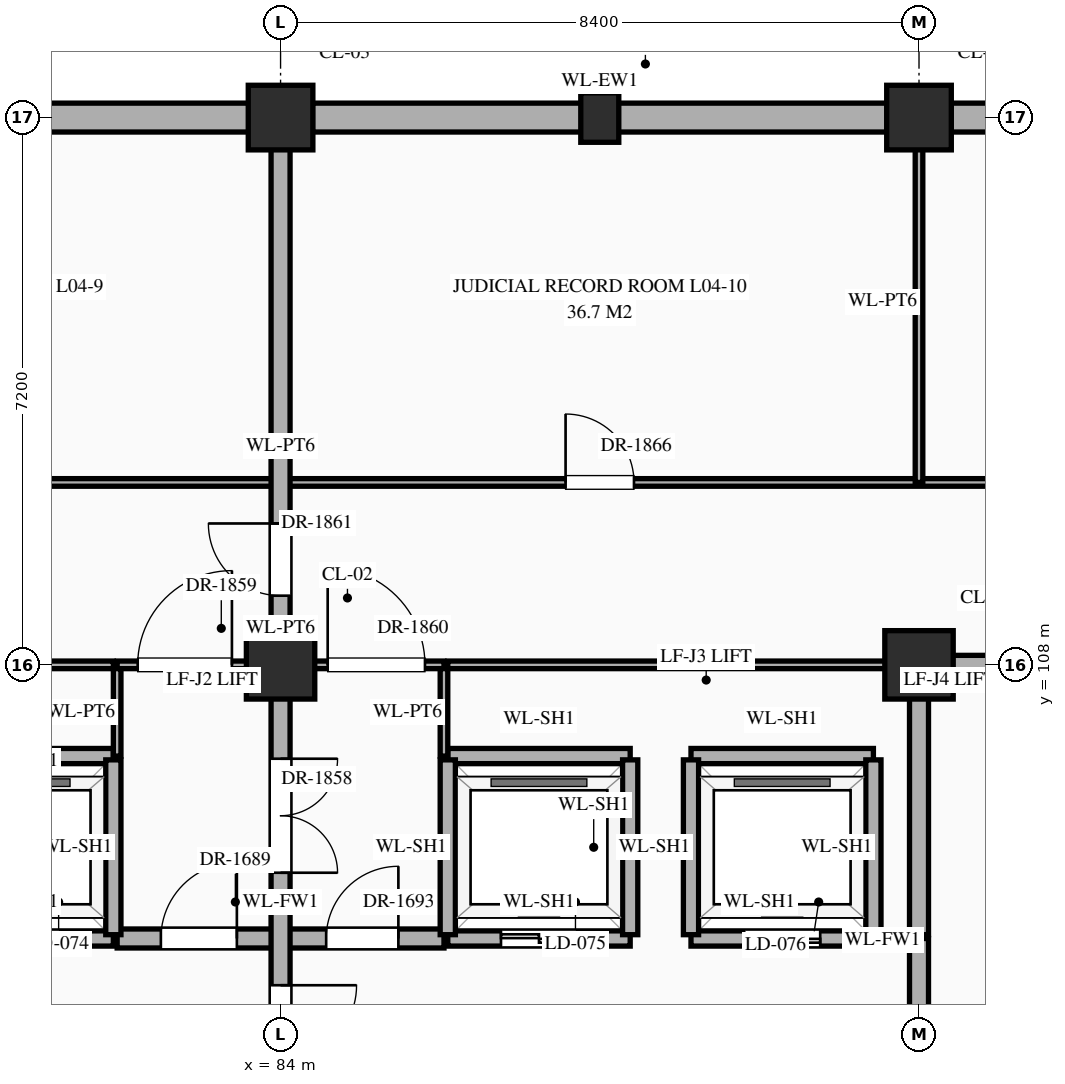
"""IFC4 building model, lengths in metres.
Left out: names, types, materials, properties, quantities, classifications, styles, units other than length and angle.
Written with IfcOpenShell. Run it as: python <this file> out.ifc"""

import sys

from ifc_helpers import new_model, si_unit, direction, frame, frame_2d, origin, origin_2d, place, context, subcontext, project, spatial, rectangle, extrude, element, fill, save


model = new_model("IFC4")
c1 = context("Model", 3, precision=1e-05, world=origin(), true_north=direction((0.0, 1.0)))
c2 = subcontext(c1, "Body", "Model", "MODEL_VIEW")
j1 = project(units=[si_unit("LENGTHUNIT", "METRE"), si_unit("PLANEANGLEUNIT", "RADIAN")], contexts=[c1])
p1 = place(None, origin())
s1 = spatial("IfcSite", under=j1, at=p1, CompositionType="ELEMENT")
p2 = place(p1, origin())
s2 = spatial("IfcBuilding", under=s1, at=p2, CompositionType="ELEMENT")
p3 = place(p2, frame((0.0, 0.0, 16.2)))
s3 = spatial("IfcBuildingStorey", under=s2, at=p3, CompositionType="ELEMENT", Elevation=16.2)
p4 = place(p3, frame((84.0, 108.0, 0.0), z_axis=(0.0, 0.0, 1.0), x_axis=(1.0, 0.0, 0.0)))
e1 = element("IfcColumn", 1, at=p4, inside=s3, PredefinedType="COLUMN", context=c2, shape_type="SweptSolid", body=[
    extrude(rectangle(XDim=0.9, YDim=0.9, at=origin_2d()), origin(), (0.0, 0.0, 1.0), 5.4),
])
p5 = place(p3, frame((84.0, 115.2, 0.0), z_axis=(0.0, 0.0, 1.0), x_axis=(1.0, 0.0, 0.0)))
e2 = element("IfcColumn", 2, at=p5, inside=s3, PredefinedType="COLUMN", context=c2, shape_type="SweptSolid", body=[
    extrude(rectangle(XDim=0.85, YDim=0.85, at=origin_2d()), origin(), (0.0, 0.0, 1.0), 5.4),
])
p6 = place(p3, frame((92.4, 108.0, 0.0), z_axis=(0.0, 0.0, 1.0), x_axis=(1.0, 0.0, 0.0)))
e3 = element("IfcColumn", 3, at=p6, inside=s3, PredefinedType="COLUMN", context=c2, shape_type="SweptSolid", body=[
    extrude(rectangle(XDim=0.9, YDim=0.9, at=origin_2d()), origin(), (0.0, 0.0, 1.0), 5.4),
])
p7 = place(p3, frame((92.4, 115.2, 0.0), z_axis=(0.0, 0.0, 1.0), x_axis=(1.0, 0.0, 0.0)))
e4 = element("IfcColumn", 4, at=p7, inside=s3, PredefinedType="COLUMN", context=c2, shape_type="SweptSolid", body=[
    extrude(rectangle(XDim=0.85, YDim=0.85, at=origin_2d()), origin(), (0.0, 0.0, 1.0), 5.4),
])
p8 = place(p3, frame((88.2, 115.2, 0.0), z_axis=(0.0, 0.0, 1.0), x_axis=(1.0, 0.0, 0.0)))
e5 = element("IfcColumn", 5, at=p8, inside=s3, PredefinedType="PILASTER", context=c2, shape_type="SweptSolid", body=[
    extrude(rectangle(XDim=0.5, YDim=0.65, at=origin_2d()), origin(), (0.0, 0.0, 1.0), 5.4),
])
for number, where, z_axis, x_axis in (
    (6, (76.02, 115.2, 0.0), (0.0, 0.0, 1.0), (1.0, 0.0, 0.0)),
    (7, (84.42, 115.2, 0.0), (0.0, 0.0, 1.0), (1.0, 0.0, 0.0)),
):
    element("IfcWall", number, at=place(p3, frame(where, z_axis=z_axis, x_axis=x_axis)), inside=s3, PredefinedType="STANDARD", context=c2, shape_type="SweptSolid", body=[
        extrude(rectangle(XDim=7.56, YDim=0.38, at=frame_2d((3.78, 0.0))), origin(), (0.0, 0.0, 1.0), 4.47),
    ])
p9 = place(p3, frame((92.82, 115.2, 0.0), z_axis=(0.0, 0.0, 1.0), x_axis=(1.0, 0.0, 0.0)))
e8 = element("IfcWall", 8, at=p9, inside=s3, PredefinedType="STANDARD", context=c2, shape_type="SweptSolid", body=[
    extrude(rectangle(XDim=7.56, YDim=0.38, at=frame_2d((3.78, 0.0))), origin(), (0.0, 0.0, 1.0), 4.47),
])
p10 = place(p3, frame((79.4, 104.4, 0.0), z_axis=(0.0, 0.0, 1.0), x_axis=(1.0, 0.0, 0.0)))
e9 = element("IfcWall", 9, at=p10, inside=s3, PredefinedType="STANDARD", context=c2, shape_type="SweptSolid", body=[
    extrude(rectangle(XDim=2.4, YDim=0.2, at=frame_2d((1.2, 0.0))), origin(), (0.0, 0.0, 1.0), 5.12),
])
p11 = place(p10, frame((0.7, 0.0, 0.0)))
e10 = element("IfcOpeningElement", 10, at=p11, cuts=e9, PredefinedType="OPENING", context=c2, shape_type="SweptSolid", body=[
    extrude(rectangle(XDim=1.0, YDim=2.15, at=frame_2d((0.5, 1.075))), frame((0.0, 0.112, 0.0), z_axis=(0.0, -1.0, 0.0), x_axis=(1.0, 0.0, 0.0)), (0.0, 0.0, 1.0), 0.224),
])
p12 = place(p3, frame((81.85, 104.4, 0.0), z_axis=(0.0, 0.0, 1.0), x_axis=(1.0, 0.0, 0.0)))
e11 = element("IfcWall", 11, at=p12, inside=s3, PredefinedType="STANDARD", context=c2, shape_type="SweptSolid", body=[
    extrude(rectangle(XDim=4.3, YDim=0.25, at=frame_2d((2.15, 0.0))), origin(), (0.0, 0.0, 1.0), 5.12),
])
p13 = place(p12, frame((0.575, 0.0, 0.0)))
e12 = element("IfcOpeningElement", 12, at=p13, cuts=e11, PredefinedType="OPENING", context=c2, shape_type="SweptSolid", body=[
    extrude(rectangle(XDim=1.0, YDim=2.2, at=frame_2d((0.5, 1.1))), frame((0.0, 0.137, 0.0), z_axis=(0.0, -1.0, 0.0), x_axis=(1.0, 0.0, 0.0)), (0.0, 0.0, 1.0), 0.274),
])
p14 = place(p12, frame((2.75, 0.0, 0.0)))
e13 = element("IfcOpeningElement", 13, at=p14, cuts=e11, PredefinedType="OPENING", context=c2, shape_type="SweptSolid", body=[
    extrude(rectangle(XDim=0.95, YDim=2.15, at=frame_2d((0.475, 1.075))), frame((0.0, 0.137, 0.0), z_axis=(0.0, -1.0, 0.0), x_axis=(1.0, 0.0, 0.0)), (0.0, 0.0, 1.0), 0.274),
])
p15 = place(p3, frame((86.2, 104.4, 0.0), z_axis=(0.0, 0.0, 1.0), x_axis=(1.0, 0.0, 0.0)))
e14 = element("IfcWall", 14, at=p15, inside=s3, PredefinedType="STANDARD", context=c2, shape_type="SweptSolid", body=[
    extrude(rectangle(XDim=2.4, YDim=0.2, at=frame_2d((1.2, 0.0))), origin(), (0.0, 0.0, 1.0), 5.12),
])
p16 = place(p15, frame((0.7, 0.0, 0.0)))
e15 = element("IfcOpeningElement", 15, at=p16, cuts=e14, PredefinedType="OPENING", context=c2, shape_type="SweptSolid", body=[
    extrude(rectangle(XDim=1.0, YDim=2.15, at=frame_2d((0.5, 1.075))), frame((0.0, 0.112, 0.0), z_axis=(0.0, -1.0, 0.0), x_axis=(1.0, 0.0, 0.0)), (0.0, 0.0, 1.0), 0.224),
])
p17 = place(p3, frame((89.4, 104.4, 0.0), z_axis=(0.0, 0.0, 1.0), x_axis=(1.0, 0.0, 0.0)))
e16 = element("IfcWall", 16, at=p17, inside=s3, PredefinedType="STANDARD", context=c2, shape_type="SweptSolid", body=[
    extrude(rectangle(XDim=2.4, YDim=0.2, at=frame_2d((1.2, 0.0))), origin(), (0.0, 0.0, 1.0), 5.12),
])
p18 = place(p17, frame((0.7, 0.0, 0.0)))
e17 = element("IfcOpeningElement", 17, at=p18, cuts=e16, PredefinedType="OPENING", context=c2, shape_type="SweptSolid", body=[
    extrude(rectangle(XDim=1.0, YDim=2.15, at=frame_2d((0.5, 1.075))), frame((0.0, 0.112, 0.0), z_axis=(0.0, -1.0, 0.0), x_axis=(1.0, 0.0, 0.0)), (0.0, 0.0, 1.0), 0.224),
])
for number, where, z_axis, x_axis in (
    (18, (79.4, 106.8, 0.0), (0.0, 0.0, 1.0), (1.0, 0.0, 0.0)),
    (19, (86.2, 106.8, 0.0), (0.0, 0.0, 1.0), (1.0, 0.0, 0.0)),
    (20, (89.4, 106.8, 0.0), (0.0, 0.0, 1.0), (1.0, 0.0, 0.0)),
):
    element("IfcWall", number, at=place(p3, frame(where, z_axis=z_axis, x_axis=x_axis)), inside=s3, PredefinedType="STANDARD", context=c2, shape_type="SweptSolid", body=[
        extrude(rectangle(XDim=2.4, YDim=0.2, at=frame_2d((1.2, 0.0))), origin(), (0.0, 0.0, 1.0), 5.12),
    ])
p19 = place(p3, frame((75.65, 108.0, 0.0), z_axis=(0.0, 0.0, 1.0), x_axis=(1.0, 0.0, 0.0)))
e21 = element("IfcWall", 21, at=p19, inside=s3, PredefinedType="STANDARD", context=c2, shape_type="SweptSolid", body=[
    extrude(rectangle(XDim=6.15, YDim=0.1, at=frame_2d((3.075, 0.0))), origin(), (0.0, 0.0, 1.0), 4.27),
])
p20 = place(p3, frame((81.85, 108.0, 0.0), z_axis=(0.0, 0.0, 1.0), x_axis=(1.0, 0.0, 0.0)))
e22 = element("IfcWall", 22, at=p20, inside=s3, PredefinedType="STANDARD", context=c2, shape_type="SweptSolid", body=[
    extrude(rectangle(XDim=4.3, YDim=0.1, at=frame_2d((2.15, 0.0))), origin(), (0.0, 0.0, 1.0), 4.27),
])
p21 = place(p20, frame((0.27, 0.0, 0.0)))
e23 = element("IfcOpeningElement", 23, at=p21, cuts=e22, PredefinedType="OPENING", context=c2, shape_type="SweptSolid", body=[
    extrude(rectangle(XDim=1.24, YDim=2.3, at=frame_2d((0.62, 1.15))), frame((0.0, 0.062, 0.0), z_axis=(0.0, -1.0, 0.0), x_axis=(1.0, 0.0, 0.0)), (0.0, 0.0, 1.0), 0.124),
])
p22 = place(p20, frame((2.77, 0.0, 0.0)))
e24 = element("IfcOpeningElement", 24, at=p22, cuts=e22, PredefinedType="OPENING", context=c2, shape_type="SweptSolid", body=[
    extrude(rectangle(XDim=1.28, YDim=2.35, at=frame_2d((0.64, 1.175))), frame((0.0, 0.062, 0.0), z_axis=(0.0, -1.0, 0.0), x_axis=(1.0, 0.0, 0.0)), (0.0, 0.0, 1.0), 0.124),
])
p23 = place(p3, frame((86.2, 108.0, 0.0), z_axis=(0.0, 0.0, 1.0), x_axis=(1.0, 0.0, 0.0)))
e25 = element("IfcWall", 25, at=p23, inside=s3, PredefinedType="STANDARD", context=c2, shape_type="SweptSolid", body=[
    extrude(rectangle(XDim=6.15, YDim=0.1, at=frame_2d((3.075, 0.0))), origin(), (0.0, 0.0, 1.0), 4.27),
])
p24 = place(p3, frame((92.4, 108.0, 0.0), z_axis=(0.0, 0.0, 1.0), x_axis=(1.0, 0.0, 0.0)))
e26 = element("IfcWall", 26, at=p24, inside=s3, PredefinedType="STANDARD", context=c2, shape_type="SweptSolid", body=[
    extrude(rectangle(XDim=4.2, YDim=0.25, at=frame_2d((2.1, 0.0))), origin(), (0.0, 0.0, 1.0), 4.27),
])
p25 = place(p24, frame((1.735, 0.0, 0.0)))
e27 = element("IfcOpeningElement", 27, at=p25, cuts=e26, PredefinedType="OPENING", context=c2, shape_type="SweptSolid", body=[
    extrude(rectangle(XDim=1.1, YDim=2.2, at=frame_2d((0.55, 1.1))), frame((0.0, 0.137, 0.0), z_axis=(0.0, -1.0, 0.0), x_axis=(1.0, 0.0, 0.0)), (0.0, 0.0, 1.0), 0.274),
])
p26 = place(p3, frame((67.2, 110.4, 0.0), z_axis=(0.0, 0.0, 1.0), x_axis=(1.0, 0.0, 0.0)))
e28 = element("IfcWall", 28, at=p26, inside=s3, PredefinedType="STANDARD", context=c2, shape_type="SweptSolid", body=[
    extrude(rectangle(XDim=33.6, YDim=0.1, at=frame_2d((16.8, 0.0))), origin(), (0.0, 0.0, 1.0), 5.12),
])
p27 = place(p26, frame((3.67, 0.0, 0.0)))
e29 = element("IfcOpeningElement", 29, at=p27, cuts=e28, PredefinedType="OPENING", context=c2, shape_type="SweptSolid", body=[
    extrude(rectangle(XDim=1.06, YDim=2.4, at=frame_2d((0.53, 1.2))), frame((0.0, 0.062, 0.0), z_axis=(0.0, -1.0, 0.0), x_axis=(1.0, 0.0, 0.0)), (0.0, 0.0, 1.0), 0.124),
])
p28 = place(p26, frame((12.03, 0.0, 0.0)))
e30 = element("IfcOpeningElement", 30, at=p28, cuts=e28, PredefinedType="OPENING", context=c2, shape_type="SweptSolid", body=[
    extrude(rectangle(XDim=1.14, YDim=2.4, at=frame_2d((0.57, 1.2))), frame((0.0, 0.062, 0.0), z_axis=(0.0, -1.0, 0.0), x_axis=(1.0, 0.0, 0.0)), (0.0, 0.0, 1.0), 0.124),
])
p29 = place(p26, frame((20.55, 0.0, 0.0)))
e31 = element("IfcOpeningElement", 31, at=p29, cuts=e28, PredefinedType="OPENING", context=c2, shape_type="SweptSolid", body=[
    extrude(rectangle(XDim=0.9, YDim=2.15, at=frame_2d((0.45, 1.075))), frame((0.0, 0.062, 0.0), z_axis=(0.0, -1.0, 0.0), x_axis=(1.0, 0.0, 0.0)), (0.0, 0.0, 1.0), 0.124),
])
p30 = place(p26, frame((28.97, 0.0, 0.0)))
e32 = element("IfcOpeningElement", 32, at=p30, cuts=e28, PredefinedType="OPENING", context=c2, shape_type="SweptSolid", body=[
    extrude(rectangle(XDim=0.86, YDim=2.1, at=frame_2d((0.43, 1.05))), frame((0.0, 0.062, 0.0), z_axis=(0.0, -1.0, 0.0), x_axis=(1.0, 0.0, 0.0)), (0.0, 0.0, 1.0), 0.124),
])
p31 = place(p3, frame((81.8, 104.45, 0.0), z_axis=(0.0, 0.0, 1.0), x_axis=(0.0, 1.0, 0.0)))
e33 = element("IfcWall", 33, at=p31, inside=s3, PredefinedType="STANDARD", context=c2, shape_type="SweptSolid", body=[
    extrude(rectangle(XDim=2.3, YDim=0.2, at=frame_2d((1.15, 0.0))), origin(), (0.0, 0.0, 1.0), 5.12),
])
p32 = place(p3, frame((81.85, 106.8, 0.0), z_axis=(0.0, 0.0, 1.0), x_axis=(0.0, 1.0, 0.0)))
e34 = element("IfcWall", 34, at=p32, inside=s3, PredefinedType="STANDARD", context=c2, shape_type="SweptSolid", body=[
    extrude(rectangle(XDim=1.15, YDim=0.1, at=frame_2d((0.575, 0.0))), origin(), (0.0, 0.0, 1.0), 5.12),
])
p33 = place(p3, frame((84.0, 79.2, 0.0), z_axis=(0.0, 0.0, 1.0), x_axis=(0.0, 1.0, 0.0)))
e35 = element("IfcWall", 35, at=p33, inside=s3, PredefinedType="STANDARD", context=c2, shape_type="SweptSolid", body=[
    extrude(rectangle(XDim=35.96, YDim=0.25, at=frame_2d((17.98, 0.0))), origin(), (0.0, 0.0, 1.0), 4.37),
])
p34 = place(p33, frame((22.585, 0.0, 0.0)))
e36 = element("IfcOpeningElement", 36, at=p34, cuts=e35, PredefinedType="OPENING", context=c2, shape_type="SweptSolid", body=[
    extrude(rectangle(XDim=2.0, YDim=2.4, at=frame_2d((1.0, 1.2))), frame((0.0, 0.137, 0.0), z_axis=(0.0, -1.0, 0.0), x_axis=(1.0, 0.0, 0.0)), (0.0, 0.0, 1.0), 0.274),
])
p35 = place(p33, frame((12.465, 0.0, 0.0)))
e37 = element("IfcOpeningElement", 37, at=p35, cuts=e35, PredefinedType="OPENING", context=c2, shape_type="SweptSolid", body=[
    extrude(rectangle(XDim=1.1, YDim=2.2, at=frame_2d((0.55, 1.1))), frame((0.0, 0.137, 0.0), z_axis=(0.0, -1.0, 0.0), x_axis=(1.0, 0.0, 0.0)), (0.0, 0.0, 1.0), 0.274),
])
p36 = place(p33, frame((15.31, 0.0, 0.0)))
e38 = element("IfcOpeningElement", 38, at=p36, cuts=e35, PredefinedType="OPENING", context=c2, shape_type="SweptSolid", body=[
    extrude(rectangle(XDim=0.95, YDim=2.15, at=frame_2d((0.475, 1.075))), frame((0.0, 0.137, 0.0), z_axis=(0.0, -1.0, 0.0), x_axis=(1.0, 0.0, 0.0)), (0.0, 0.0, 1.0), 0.274),
])
p37 = place(p33, frame((26.065, 0.0, 0.0)))
e39 = element("IfcOpeningElement", 39, at=p37, cuts=e35, PredefinedType="OPENING", context=c2, shape_type="SweptSolid", body=[
    extrude(rectangle(XDim=1.5, YDim=2.25, at=frame_2d((0.75, 1.125))), frame((0.0, 0.137, 0.0), z_axis=(0.0, -1.0, 0.0), x_axis=(1.0, 0.0, 0.0)), (0.0, 0.0, 1.0), 0.274),
])
p38 = place(p33, frame((29.71, 0.0, 0.0)))
e40 = element("IfcOpeningElement", 40, at=p38, cuts=e35, PredefinedType="OPENING", context=c2, shape_type="SweptSolid", body=[
    extrude(rectangle(XDim=0.95, YDim=2.15, at=frame_2d((0.475, 1.075))), frame((0.0, 0.137, 0.0), z_axis=(0.0, -1.0, 0.0), x_axis=(1.0, 0.0, 0.0)), (0.0, 0.0, 1.0), 0.274),
])
p39 = place(p33, frame((5.315, 0.0, 0.0)))
e41 = element("IfcOpeningElement", 41, at=p39, cuts=e35, PredefinedType="OPENING", context=c2, shape_type="SweptSolid", body=[
    extrude(rectangle(XDim=1.0, YDim=2.2, at=frame_2d((0.5, 1.1))), frame((0.0, 0.137, 0.0), z_axis=(0.0, -1.0, 0.0), x_axis=(1.0, 0.0, 0.0)), (0.0, 0.0, 1.0), 0.274),
])
p40 = place(p3, frame((86.15, 106.8, 0.0), z_axis=(0.0, 0.0, 1.0), x_axis=(0.0, 1.0, 0.0)))
e42 = element("IfcWall", 42, at=p40, inside=s3, PredefinedType="STANDARD", context=c2, shape_type="SweptSolid", body=[
    extrude(rectangle(XDim=1.15, YDim=0.1, at=frame_2d((0.575, 0.0))), origin(), (0.0, 0.0, 1.0), 5.12),
])
for number, where, z_axis, x_axis in (
    (43, (86.2, 104.45, 0.0), (0.0, 0.0, 1.0), (0.0, 1.0, 0.0)),
    (44, (88.6, 104.45, 0.0), (0.0, 0.0, 1.0), (0.0, 1.0, 0.0)),
    (45, (89.4, 104.45, 0.0), (0.0, 0.0, 1.0), (0.0, 1.0, 0.0)),
    (46, (91.8, 104.45, 0.0), (0.0, 0.0, 1.0), (0.0, 1.0, 0.0)),
):
    element("IfcWall", number, at=place(p3, frame(where, z_axis=z_axis, x_axis=x_axis)), inside=s3, PredefinedType="STANDARD", context=c2, shape_type="SweptSolid", body=[
        extrude(rectangle(XDim=2.3, YDim=0.2, at=frame_2d((1.15, 0.0))), origin(), (0.0, 0.0, 1.0), 5.12),
    ])
p41 = place(p3, frame((92.4, 100.8, 0.0), z_axis=(0.0, 0.0, 1.0), x_axis=(0.0, 1.0, 0.0)))
e47 = element("IfcWall", 47, at=p41, inside=s3, PredefinedType="STANDARD", context=c2, shape_type="SweptSolid", body=[
    extrude(rectangle(XDim=3.6, YDim=0.25, at=frame_2d((1.8, 0.0))), origin(), (0.0, 0.0, 1.0), 4.37),
])
p42 = place(p41, frame((0.885, 0.0, 0.0)))
e48 = element("IfcOpeningElement", 48, at=p42, cuts=e47, PredefinedType="OPENING", context=c2, shape_type="SweptSolid", body=[
    extrude(rectangle(XDim=1.0, YDim=2.2, at=frame_2d((0.5, 1.1))), frame((0.0, 0.137, 0.0), z_axis=(0.0, -1.0, 0.0), x_axis=(1.0, 0.0, 0.0)), (0.0, 0.0, 1.0), 0.274),
])
p43 = place(p3, frame((92.4, 104.45, 0.0), z_axis=(0.0, 0.0, 1.0), x_axis=(0.0, 1.0, 0.0)))
e49 = element("IfcWall", 49, at=p43, inside=s3, PredefinedType="STANDARD", context=c2, shape_type="SweptSolid", body=[
    extrude(rectangle(XDim=3.5, YDim=0.25, at=frame_2d((1.75, 0.0))), origin(), (0.0, 0.0, 1.0), 4.37),
])
p44 = place(p3, frame((92.4, 110.4, 0.0), z_axis=(0.0, 0.0, 1.0), x_axis=(0.0, 1.0, 0.0)))
e50 = element("IfcWall", 50, at=p44, inside=s3, PredefinedType="STANDARD", context=c2, shape_type="SweptSolid", body=[
    extrude(rectangle(XDim=4.76, YDim=0.1, at=frame_2d((2.38, 0.0))), origin(), (0.0, 0.0, 1.0), 4.37),
])
p45 = place(p11, origin())
e51 = element("IfcDoor", 51, at=p45, inside=s3, OperationType="DOUBLE_DOOR_SLIDING", PredefinedType="DOOR", context=c2, shape_type="SweptSolid", body=[
    extrude(rectangle(XDim=1.0, YDim=2.15, at=frame_2d((0.5, 1.075))), frame((0.0, 0.025, 0.0), z_axis=(0.0, -1.0, 0.0), x_axis=(1.0, 0.0, 0.0)), (0.0, 0.0, 1.0), 0.05),
])
fill(e10, e51)
p46 = place(p16, origin())
e52 = element("IfcDoor", 52, at=p46, inside=s3, OperationType="DOUBLE_DOOR_SLIDING", PredefinedType="DOOR", context=c2, shape_type="SweptSolid", body=[
    extrude(rectangle(XDim=1.0, YDim=2.15, at=frame_2d((0.5, 1.075))), frame((0.0, 0.025, 0.0), z_axis=(0.0, -1.0, 0.0), x_axis=(1.0, 0.0, 0.0)), (0.0, 0.0, 1.0), 0.05),
])
fill(e15, e52)
p47 = place(p18, origin())
e53 = element("IfcDoor", 53, at=p47, inside=s3, OperationType="DOUBLE_DOOR_SLIDING", PredefinedType="DOOR", context=c2, shape_type="SweptSolid", body=[
    extrude(rectangle(XDim=1.0, YDim=2.15, at=frame_2d((0.5, 1.075))), frame((0.0, 0.025, 0.0), z_axis=(0.0, -1.0, 0.0), x_axis=(1.0, 0.0, 0.0)), (0.0, 0.0, 1.0), 0.05),
])
fill(e17, e53)
p48 = place(p34, frame((2.0, 0.0, 0.0), z_axis=(0.0, 0.0, 1.0), x_axis=(-1.0, 0.0, 0.0)))
e54 = element("IfcDoor", 54, at=p48, inside=s3, OperationType="DOUBLE_DOOR_SINGLE_SWING", PredefinedType="DOOR", context=c2, shape_type="SweptSolid", body=[
    extrude(rectangle(XDim=2.0, YDim=2.4, at=frame_2d((1.0, 1.2))), frame((0.0, 0.025, 0.0), z_axis=(0.0, -1.0, 0.0), x_axis=(1.0, 0.0, 0.0)), (0.0, 0.0, 1.0), 0.05),
])
fill(e36, e54)
p49 = place(p13, origin())
e55 = element("IfcDoor", 55, at=p49, inside=s3, OperationType="SINGLE_SWING_RIGHT", PredefinedType="DOOR", context=c2, shape_type="SweptSolid", body=[
    extrude(rectangle(XDim=1.0, YDim=2.2, at=frame_2d((0.5, 1.1))), frame((0.0, 0.025, 0.0), z_axis=(0.0, -1.0, 0.0), x_axis=(1.0, 0.0, 0.0)), (0.0, 0.0, 1.0), 0.05),
])
fill(e12, e55)
p50 = place(p14, origin())
e56 = element("IfcDoor", 56, at=p50, inside=s3, OperationType="SINGLE_SWING_RIGHT", PredefinedType="DOOR", context=c2, shape_type="SweptSolid", body=[
    extrude(rectangle(XDim=0.95, YDim=2.15, at=frame_2d((0.475, 1.075))), frame((0.0, 0.025, 0.0), z_axis=(0.0, -1.0, 0.0), x_axis=(1.0, 0.0, 0.0)), (0.0, 0.0, 1.0), 0.05),
])
fill(e13, e56)
p51 = place(p37, frame((1.5, 0.0, 0.0), z_axis=(0.0, 0.0, 1.0), x_axis=(-1.0, 0.0, 0.0)))
e57 = element("IfcDoor", 57, at=p51, inside=s3, OperationType="DOUBLE_DOOR_SINGLE_SWING", PredefinedType="DOOR", context=c2, shape_type="SweptSolid", body=[
    extrude(rectangle(XDim=1.5, YDim=2.25, at=frame_2d((0.75, 1.125))), frame((0.0, 0.025, 0.0), z_axis=(0.0, -1.0, 0.0), x_axis=(1.0, 0.0, 0.0)), (0.0, 0.0, 1.0), 0.05),
])
fill(e39, e57)
p52 = place(p21, origin())
e58 = element("IfcDoor", 58, at=p52, inside=s3, OperationType="SINGLE_SWING_RIGHT", PredefinedType="DOOR", context=c2, shape_type="SweptSolid", body=[
    extrude(rectangle(XDim=1.24, YDim=2.3, at=frame_2d((0.62, 1.15))), frame((0.0, 0.025, 0.0), z_axis=(0.0, -1.0, 0.0), x_axis=(1.0, 0.0, 0.0)), (0.0, 0.0, 1.0), 0.05),
])
fill(e23, e58)
p53 = place(p22, origin())
e59 = element("IfcDoor", 59, at=p53, inside=s3, OperationType="SINGLE_SWING_LEFT", PredefinedType="DOOR", context=c2, shape_type="SweptSolid", body=[
    extrude(rectangle(XDim=1.28, YDim=2.35, at=frame_2d((0.64, 1.175))), frame((0.0, 0.025, 0.0), z_axis=(0.0, -1.0, 0.0), x_axis=(1.0, 0.0, 0.0)), (0.0, 0.0, 1.0), 0.05),
])
fill(e24, e59)
p54 = place(p38, origin())
e60 = element("IfcDoor", 60, at=p54, inside=s3, OperationType="SINGLE_SWING_RIGHT", PredefinedType="DOOR", context=c2, shape_type="SweptSolid", body=[
    extrude(rectangle(XDim=0.95, YDim=2.15, at=frame_2d((0.475, 1.075))), frame((0.0, 0.025, 0.0), z_axis=(0.0, -1.0, 0.0), x_axis=(1.0, 0.0, 0.0)), (0.0, 0.0, 1.0), 0.05),
])
fill(e40, e60)
p55 = place(p29, origin())
e61 = element("IfcDoor", 61, at=p55, inside=s3, OperationType="SINGLE_SWING_LEFT", PredefinedType="DOOR", context=c2, shape_type="SweptSolid", body=[
    extrude(rectangle(XDim=0.9, YDim=2.15, at=frame_2d((0.45, 1.075))), frame((0.0, 0.025, 0.0), z_axis=(0.0, -1.0, 0.0), x_axis=(1.0, 0.0, 0.0)), (0.0, 0.0, 1.0), 0.05),
])
fill(e31, e61)
save(model, sys.argv[1])
